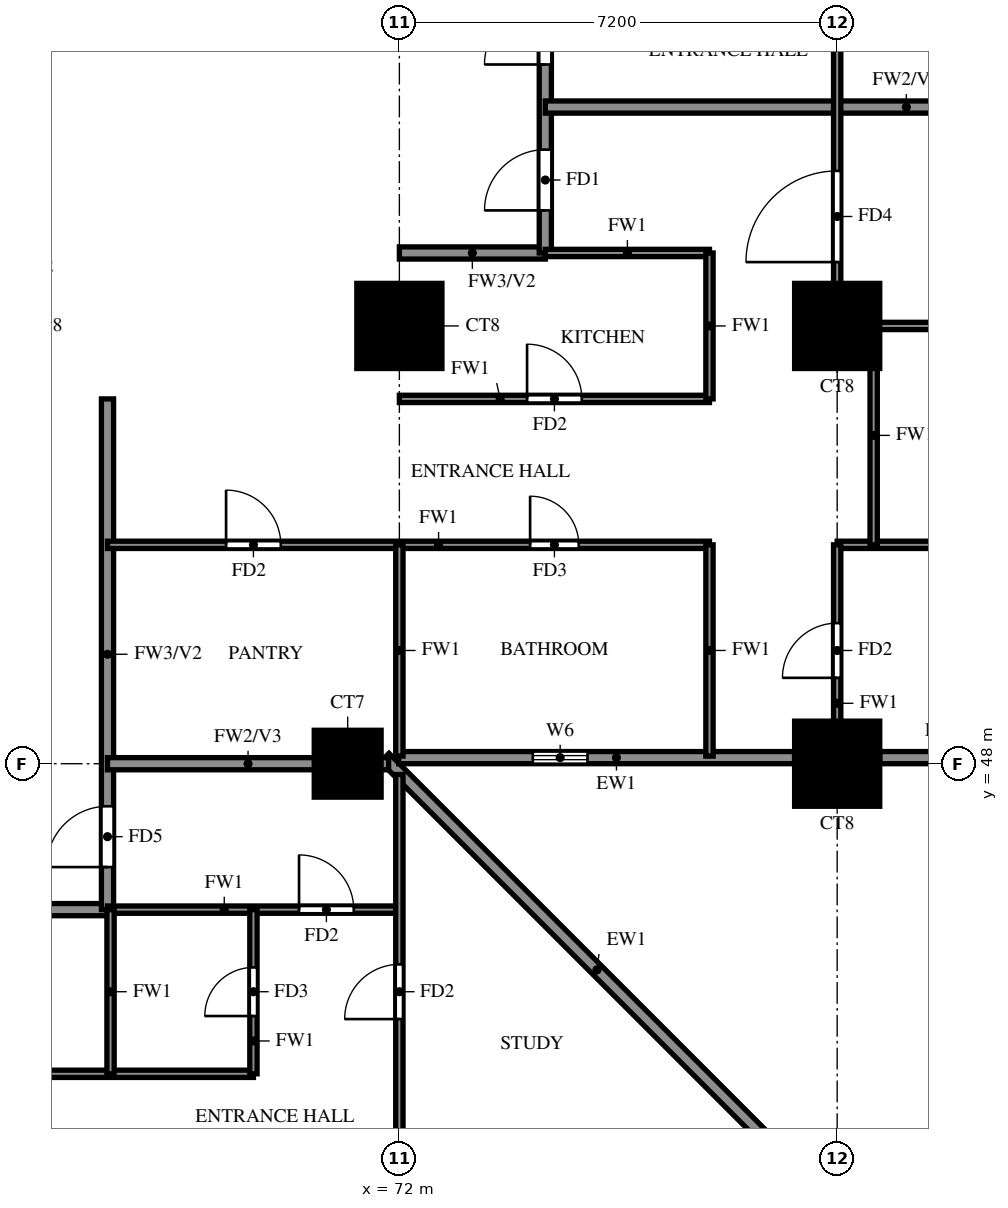
"""IFC4 building model, lengths in metres.
Left out: names, types, materials, properties, quantities, classifications, styles, units other than length and angle.
Written with IfcOpenShell. Run it as: python <this file> out.ifc"""

import sys

from ifc_helpers import new_model, si_unit, direction, frame, frame_2d, origin, origin_2d, place, context, subcontext, project, spatial, rectangle, extrude, source, transform, mapped, element, fill, save


model = new_model("IFC4")
c1 = context("Model", 3, precision=1e-05, world=origin(), true_north=direction((0.0, 1.0)))
c2 = subcontext(c1, "Body", "Model", "MODEL_VIEW")
j1 = project(units=[si_unit("LENGTHUNIT", "METRE"), si_unit("PLANEANGLEUNIT", "RADIAN")], contexts=[c1])
p1 = place(None, origin())
s1 = spatial("IfcSite", under=j1, at=p1, CompositionType="ELEMENT")
p2 = place(p1, origin())
s2 = spatial("IfcBuilding", under=s1, at=p2, CompositionType="ELEMENT")
p3 = place(p2, frame((0.0, 0.0, 37.5)))
s3 = spatial("IfcBuildingStorey", under=s2, at=p3, CompositionType="ELEMENT", Elevation=37.5)
m1 = source(origin(), c2, "Body", "SweptSolid", [
    extrude(rectangle(XDim=1.1, YDim=1.1, at=origin_2d()), origin(), (0.0, 0.0, 1.0), 3.18),
])
p4 = place(p3, frame((71.15, 48.0, 0.0), z_axis=(0.0, 0.0, 1.0), x_axis=(1.0, 0.0, 0.0)))
e1 = element("IfcColumn", 1, at=p4, inside=s3, PredefinedType="COLUMN", context=c2, shape_type="MappedRepresentation", body=[
    mapped(m1, transform((0.0, 0.0, 0.0))),
])
m2 = source(origin(), c2, "Body", "SweptSolid", [
    extrude(rectangle(XDim=1.4, YDim=1.4, at=origin_2d()), origin(), (0.0, 0.0, 1.0), 3.18),
])
for number, where, z_axis, x_axis in (
    (2, (79.2, 48.0, 0.0), (0.0, 0.0, 1.0), (1.0, 0.0, 0.0)),
    (3, (72.0, 55.2, 0.0), (0.0, 0.0, 1.0), (1.0, 0.0, 0.0)),
    (4, (79.2, 55.2, 0.0), (0.0, 0.0, 1.0), (1.0, 0.0, 0.0)),
):
    element("IfcColumn", number, at=place(p3, frame(where, z_axis=z_axis, x_axis=x_axis)), inside=s3, PredefinedType="COLUMN", context=c2, shape_type="MappedRepresentation", body=[
        mapped(m2, transform((0.0, 0.0, 0.0))),
    ])
p5 = place(p3, frame((78.74, 41.118, 0.0), z_axis=(0.0, 0.0, 1.0), x_axis=(-0.707106781187, 0.707106781187, 0.0)))
e5 = element("IfcWall", 5, at=p5, inside=s3, PredefinedType="SOLIDWALL", context=c2, shape_type="SweptSolid", body=[
    extrude(rectangle(XDim=9.874, YDim=0.2, at=frame_2d((4.937, 0.0))), origin(), (0.0, 0.0, 1.0), 3.18),
])
p6 = place(p3, frame((71.989, 48.1, 0.0), z_axis=(0.0, 0.0, 1.0), x_axis=(1.0, 0.0, 0.0)))
e6 = element("IfcWall", 6, at=p6, inside=s3, PredefinedType="SOLIDWALL", context=c2, shape_type="SweptSolid", body=[
    extrude(rectangle(XDim=6.511, YDim=0.2, at=frame_2d((3.256, 0.0))), origin(), (0.0, 0.0, 1.0), 3.18),
])
p7 = place(p6, frame((2.206, 0.0, 1.5)))
e7 = element("IfcOpeningElement", 7, at=p7, cuts=e6, PredefinedType="OPENING", context=c2, shape_type="SweptSolid", body=[
    extrude(rectangle(XDim=0.9, YDim=0.9, at=frame_2d((0.45, 0.45))), frame((0.0, 0.11, 0.0), z_axis=(0.0, -1.0, 0.0), x_axis=(1.0, 0.0, 0.0)), (0.0, 0.0, 1.0), 0.22),
])
p8 = place(p3, frame((79.9, 48.1, 0.0), z_axis=(0.0, 0.0, 1.0), x_axis=(1.0, 0.0, 0.0)))
e8 = element("IfcWall", 8, at=p8, inside=s3, PredefinedType="SOLIDWALL", context=c2, shape_type="SweptSolid", body=[
    extrude(rectangle(XDim=5.35, YDim=0.2, at=frame_2d((2.675, 0.0))), origin(), (0.0, 0.0, 1.0), 3.18),
])
p9 = place(p8, frame((1.475, 0.0, 0.6)))
e9 = element("IfcOpeningElement", 9, at=p9, cuts=e8, PredefinedType="OPENING", context=c2, shape_type="SweptSolid", body=[
    extrude(rectangle(XDim=2.4, YDim=2.4, at=frame_2d((1.2, 1.2))), frame((0.0, 0.11, 0.0), z_axis=(0.0, -1.0, 0.0), x_axis=(1.0, 0.0, 0.0)), (0.0, 0.0, 1.0), 0.22),
])
p10 = place(p3, frame((60.0, 45.6, 0.0), z_axis=(0.0, 0.0, 1.0), x_axis=(1.0, 0.0, 0.0)))
e10 = element("IfcWall", 10, at=p10, inside=s3, PredefinedType="SOLIDWALL", context=c2, shape_type="SweptSolid", body=[
    extrude(rectangle(XDim=7.25, YDim=0.2, at=frame_2d((3.625, 0.0))), origin(), (0.0, 0.0, 1.0), 3.18),
])
p11 = place(p3, frame((72.0, 56.4, 0.0), z_axis=(0.0, 0.0, 1.0), x_axis=(1.0, 0.0, 0.0)))
e11 = element("IfcWall", 11, at=p11, inside=s3, PredefinedType="SOLIDWALL", context=c2, shape_type="SweptSolid", body=[
    extrude(rectangle(XDim=2.4, YDim=0.2, at=frame_2d((1.2, 0.0))), origin(), (0.0, 0.0, 1.0), 3.18),
])
p12 = place(p3, frame((67.2, 45.6, 0.0), z_axis=(0.0, 0.0, 1.0), x_axis=(0.0, 1.0, 0.0)))
e12 = element("IfcWall", 12, at=p12, inside=s3, PredefinedType="SOLIDWALL", context=c2, shape_type="SweptSolid", body=[
    extrude(rectangle(XDim=8.4, YDim=0.2, at=frame_2d((4.2, 0.0))), origin(), (0.0, 0.0, 1.0), 3.18),
])
p13 = place(p12, frame((0.7, 0.0, 0.0)))
e13 = element("IfcOpeningElement", 13, at=p13, cuts=e12, PredefinedType="OPENING", context=c2, shape_type="SweptSolid", body=[
    extrude(rectangle(XDim=1.0, YDim=2.1, at=frame_2d((0.5, 1.05))), frame((0.0, 0.11, 0.0), z_axis=(0.0, -1.0, 0.0), x_axis=(1.0, 0.0, 0.0)), (0.0, 0.0, 1.0), 0.22),
])
p14 = place(p3, frame((74.4, 56.4, 0.0), z_axis=(0.0, 0.0, 1.0), x_axis=(0.0, 1.0, 0.0)))
e14 = element("IfcWall", 14, at=p14, inside=s3, PredefinedType="SOLIDWALL", context=c2, shape_type="SweptSolid", body=[
    extrude(rectangle(XDim=9.6, YDim=0.2, at=frame_2d((4.8, 0.0))), origin(), (0.0, 0.0, 1.0), 3.18),
])
p15 = place(p14, frame((0.7, 0.0, 0.0)))
e15 = element("IfcOpeningElement", 15, at=p15, cuts=e14, PredefinedType="OPENING", context=c2, shape_type="SweptSolid", body=[
    extrude(rectangle(XDim=1.0, YDim=2.1, at=frame_2d((0.5, 1.05))), frame((0.0, 0.11, 0.0), z_axis=(0.0, -1.0, 0.0), x_axis=(1.0, 0.0, 0.0)), (0.0, 0.0, 1.0), 0.22),
])
p16 = place(p14, frame((3.1, 0.0, 0.0)))
e16 = element("IfcOpeningElement", 16, at=p16, cuts=e14, PredefinedType="OPENING", context=c2, shape_type="SweptSolid", body=[
    extrude(rectangle(XDim=1.0, YDim=2.1, at=frame_2d((0.5, 1.05))), frame((0.0, 0.11, 0.0), z_axis=(0.0, -1.0, 0.0), x_axis=(1.0, 0.0, 0.0)), (0.0, 0.0, 1.0), 0.22),
])
p17 = place(p3, frame((67.2, 48.0, 0.0), z_axis=(0.0, 0.0, 1.0), x_axis=(1.0, 0.0, 0.0)))
e17 = element("IfcWall", 17, at=p17, inside=s3, PredefinedType="SOLIDWALL", context=c2, shape_type="SweptSolid", body=[
    extrude(rectangle(XDim=4.623, YDim=0.2, at=frame_2d((2.312, 0.0))), origin(), (0.0, 0.0, 1.0), 3.18),
])
p18 = place(p3, frame((74.4, 58.8, 0.0), z_axis=(0.0, 0.0, 1.0), x_axis=(1.0, 0.0, 0.0)))
e18 = element("IfcWall", 18, at=p18, inside=s3, PredefinedType="SOLIDWALL", context=c2, shape_type="SweptSolid", body=[
    extrude(rectangle(XDim=11.875, YDim=0.2, at=frame_2d((5.938, 0.0))), origin(), (0.0, 0.0, 1.0), 2.28),
])
p19 = place(p3, frame((60.0, 42.9, 0.0), z_axis=(0.0, 0.0, 1.0), x_axis=(1.0, 0.0, 0.0)))
e19 = element("IfcWall", 19, at=p19, inside=s3, PredefinedType="PARTITIONING", context=c2, shape_type="SweptSolid", body=[
    extrude(rectangle(XDim=9.6, YDim=0.12, at=frame_2d((4.8, 0.0))), origin(), (0.0, 0.0, 1.0), 3.18),
])
p20 = place(p19, frame((4.4, 0.0, 0.0)))
e20 = element("IfcOpeningElement", 20, at=p20, cuts=e19, PredefinedType="OPENING", context=c2, shape_type="SweptSolid", body=[
    extrude(rectangle(XDim=0.9, YDim=2.1, at=frame_2d((0.45, 1.05))), frame((0.0, 0.07, 0.0), z_axis=(0.0, -1.0, 0.0), x_axis=(1.0, 0.0, 0.0)), (0.0, 0.0, 1.0), 0.14),
])
p21 = place(p19, frame((0.825, 0.0, 0.0)))
e21 = element("IfcOpeningElement", 21, at=p21, cuts=e19, PredefinedType="OPENING", context=c2, shape_type="SweptSolid", body=[
    extrude(rectangle(XDim=0.8, YDim=2.1, at=frame_2d((0.4, 1.05))), frame((0.0, 0.07, 0.0), z_axis=(0.0, -1.0, 0.0), x_axis=(1.0, 0.0, 0.0)), (0.0, 0.0, 1.0), 0.14),
])
p22 = place(p3, frame((67.2, 45.6, 0.0), z_axis=(0.0, 0.0, 1.0), x_axis=(1.0, 0.0, 0.0)))
e22 = element("IfcWall", 22, at=p22, inside=s3, PredefinedType="PARTITIONING", context=c2, shape_type="SweptSolid", body=[
    extrude(rectangle(XDim=4.8, YDim=0.12, at=frame_2d((2.4, 0.0))), origin(), (0.0, 0.0, 1.0), 3.18),
])
p23 = place(p22, frame((3.15, 0.0, 0.0)))
e23 = element("IfcOpeningElement", 23, at=p23, cuts=e22, PredefinedType="OPENING", context=c2, shape_type="SweptSolid", body=[
    extrude(rectangle(XDim=0.9, YDim=2.1, at=frame_2d((0.45, 1.05))), frame((0.0, 0.07, 0.0), z_axis=(0.0, -1.0, 0.0), x_axis=(1.0, 0.0, 0.0)), (0.0, 0.0, 1.0), 0.14),
])
p24 = place(p3, frame((67.2, 51.6, 0.0), z_axis=(0.0, 0.0, 1.0), x_axis=(1.0, 0.0, 0.0)))
e24 = element("IfcWall", 24, at=p24, inside=s3, PredefinedType="PARTITIONING", context=c2, shape_type="SweptSolid", body=[
    extrude(rectangle(XDim=9.9, YDim=0.12, at=frame_2d((4.95, 0.0))), origin(), (0.0, 0.0, 1.0), 3.18),
])
p25 = place(p24, frame((6.95, 0.0, 0.0)))
e25 = element("IfcOpeningElement", 25, at=p25, cuts=e24, PredefinedType="OPENING", context=c2, shape_type="SweptSolid", body=[
    extrude(rectangle(XDim=0.8, YDim=2.1, at=frame_2d((0.4, 1.05))), frame((0.0, 0.07, 0.0), z_axis=(0.0, -1.0, 0.0), x_axis=(1.0, 0.0, 0.0)), (0.0, 0.0, 1.0), 0.14),
])
p26 = place(p24, frame((1.95, 0.0, 0.0)))
e26 = element("IfcOpeningElement", 26, at=p26, cuts=e24, PredefinedType="OPENING", context=c2, shape_type="SweptSolid", body=[
    extrude(rectangle(XDim=0.9, YDim=2.1, at=frame_2d((0.45, 1.05))), frame((0.0, 0.07, 0.0), z_axis=(0.0, -1.0, 0.0), x_axis=(1.0, 0.0, 0.0)), (0.0, 0.0, 1.0), 0.14),
])
p27 = place(p3, frame((79.2, 51.6, 0.0), z_axis=(0.0, 0.0, 1.0), x_axis=(1.0, 0.0, 0.0)))
e27 = element("IfcWall", 27, at=p27, inside=s3, PredefinedType="PARTITIONING", context=c2, shape_type="SweptSolid", body=[
    extrude(rectangle(XDim=7.075, YDim=0.12, at=frame_2d((3.538, 0.0))), origin(), (0.0, 0.0, 1.0), 2.28),
])
p28 = place(p27, frame((3.438, 0.0, 0.0)))
e28 = element("IfcOpeningElement", 28, at=p28, cuts=e27, PredefinedType="OPENING", context=c2, shape_type="SweptSolid", body=[
    extrude(rectangle(XDim=0.8, YDim=2.1, at=frame_2d((0.4, 1.05))), frame((0.0, 0.07, 0.0), z_axis=(0.0, -1.0, 0.0), x_axis=(1.0, 0.0, 0.0)), (0.0, 0.0, 1.0), 0.14),
])
p29 = place(p3, frame((72.0, 54.0, 0.0), z_axis=(0.0, 0.0, 1.0), x_axis=(1.0, 0.0, 0.0)))
e29 = element("IfcWall", 29, at=p29, inside=s3, PredefinedType="PARTITIONING", context=c2, shape_type="SweptSolid", body=[
    extrude(rectangle(XDim=5.1, YDim=0.12, at=frame_2d((2.55, 0.0))), origin(), (0.0, 0.0, 1.0), 3.18),
])
p30 = place(p29, frame((2.1, 0.0, 0.0)))
e30 = element("IfcOpeningElement", 30, at=p30, cuts=e29, PredefinedType="OPENING", context=c2, shape_type="SweptSolid", body=[
    extrude(rectangle(XDim=0.9, YDim=2.1, at=frame_2d((0.45, 1.05))), frame((0.0, 0.07, 0.0), z_axis=(0.0, -1.0, 0.0), x_axis=(1.0, 0.0, 0.0)), (0.0, 0.0, 1.0), 0.14),
])
p31 = place(p3, frame((79.2, 55.2, 0.0), z_axis=(0.0, 0.0, 1.0), x_axis=(1.0, 0.0, 0.0)))
e31 = element("IfcWall", 31, at=p31, inside=s3, PredefinedType="PARTITIONING", context=c2, shape_type="SweptSolid", body=[
    extrude(rectangle(XDim=7.075, YDim=0.12, at=frame_2d((3.538, 0.0))), origin(), (0.0, 0.0, 1.0), 3.18),
])
for number, where, z_axis, x_axis in (
    (32, (74.4, 56.4, 0.0), (0.0, 0.0, 1.0), (1.0, 0.0, 0.0)),
    (33, (67.25, 42.9, 0.0), (0.0, 0.0, 1.0), (0.0, 1.0, 0.0)),
):
    element("IfcWall", number, at=place(p3, frame(where, z_axis=z_axis, x_axis=x_axis)), inside=s3, PredefinedType="PARTITIONING", context=c2, shape_type="SweptSolid", body=[
        extrude(rectangle(XDim=2.7, YDim=0.12, at=frame_2d((1.35, 0.0))), origin(), (0.0, 0.0, 1.0), 3.18),
    ])
p32 = place(p3, frame((69.6, 42.9, 0.0), z_axis=(0.0, 0.0, 1.0), x_axis=(0.0, 1.0, 0.0)))
e34 = element("IfcWall", 34, at=p32, inside=s3, PredefinedType="PARTITIONING", context=c2, shape_type="SweptSolid", body=[
    extrude(rectangle(XDim=2.7, YDim=0.12, at=frame_2d((1.35, 0.0))), origin(), (0.0, 0.0, 1.0), 3.18),
])
p33 = place(p32, frame((0.95, 0.0, 0.0)))
e35 = element("IfcOpeningElement", 35, at=p33, cuts=e34, PredefinedType="OPENING", context=c2, shape_type="SweptSolid", body=[
    extrude(rectangle(XDim=0.8, YDim=2.1, at=frame_2d((0.4, 1.05))), frame((0.0, 0.07, 0.0), z_axis=(0.0, -1.0, 0.0), x_axis=(1.0, 0.0, 0.0)), (0.0, 0.0, 1.0), 0.14),
])
p34 = place(p3, frame((72.0, 33.725, 0.0), z_axis=(0.0, 0.0, 1.0), x_axis=(0.0, 1.0, 0.0)))
e36 = element("IfcWall", 36, at=p34, inside=s3, PredefinedType="PARTITIONING", context=c2, shape_type="SweptSolid", body=[
    extrude(rectangle(XDim=14.098, YDim=0.12, at=frame_2d((7.049, 0.0))), origin(), (0.0, 0.0, 1.0), 2.28),
])
p35 = place(p34, frame((10.075, 0.0, 0.0)))
e37 = element("IfcOpeningElement", 37, at=p35, cuts=e36, PredefinedType="OPENING", context=c2, shape_type="SweptSolid", body=[
    extrude(rectangle(XDim=0.9, YDim=2.1, at=frame_2d((0.45, 1.05))), frame((0.0, 0.07, 0.0), z_axis=(0.0, -1.0, 0.0), x_axis=(1.0, 0.0, 0.0)), (0.0, 0.0, 1.0), 0.14),
])
for number, where, z_axis, x_axis in (
    (38, (72.0, 48.125, 0.0), (0.0, 0.0, 1.0), (0.0, 1.0, 0.0)),
    (39, (77.1, 48.125, 0.0), (0.0, 0.0, 1.0), (0.0, 1.0, 0.0)),
):
    element("IfcWall", number, at=place(p3, frame(where, z_axis=z_axis, x_axis=x_axis)), inside=s3, PredefinedType="PARTITIONING", context=c2, shape_type="SweptSolid", body=[
        extrude(rectangle(XDim=3.475, YDim=0.12, at=frame_2d((1.738, 0.0))), origin(), (0.0, 0.0, 1.0), 3.18),
    ])
p36 = place(p3, frame((77.1, 54.0, 0.0), z_axis=(0.0, 0.0, 1.0), x_axis=(0.0, 1.0, 0.0)))
e40 = element("IfcWall", 40, at=p36, inside=s3, PredefinedType="PARTITIONING", context=c2, shape_type="SweptSolid", body=[
    extrude(rectangle(XDim=2.4, YDim=0.12, at=frame_2d((1.2, 0.0))), origin(), (0.0, 0.0, 1.0), 3.18),
])
p37 = place(p3, frame((79.2, 48.125, 0.0), z_axis=(0.0, 0.0, 1.0), x_axis=(0.0, 1.0, 0.0)))
e41 = element("IfcWall", 41, at=p37, inside=s3, PredefinedType="PARTITIONING", context=c2, shape_type="SweptSolid", body=[
    extrude(rectangle(XDim=3.475, YDim=0.12, at=frame_2d((1.738, 0.0))), origin(), (0.0, 0.0, 1.0), 3.18),
])
p38 = place(p37, frame((1.288, 0.0, 0.0)))
e42 = element("IfcOpeningElement", 42, at=p38, cuts=e41, PredefinedType="OPENING", context=c2, shape_type="SweptSolid", body=[
    extrude(rectangle(XDim=0.9, YDim=2.1, at=frame_2d((0.45, 1.05))), frame((0.0, 0.07, 0.0), z_axis=(0.0, -1.0, 0.0), x_axis=(1.0, 0.0, 0.0)), (0.0, 0.0, 1.0), 0.14),
])
p39 = place(p3, frame((79.2, 55.2, 0.0), z_axis=(0.0, 0.0, 1.0), x_axis=(0.0, 1.0, 0.0)))
e43 = element("IfcWall", 43, at=p39, inside=s3, PredefinedType="PARTITIONING", context=c2, shape_type="SweptSolid", body=[
    extrude(rectangle(XDim=18.0, YDim=0.12, at=frame_2d((9.0, 0.0))), origin(), (0.0, 0.0, 1.0), 3.18),
])
p40 = place(p39, frame((1.05, 0.0, 0.0)))
e44 = element("IfcOpeningElement", 44, at=p40, cuts=e43, PredefinedType="OPENING", context=c2, shape_type="SweptSolid", body=[
    extrude(rectangle(XDim=1.5, YDim=2.1, at=frame_2d((0.75, 1.05))), frame((0.0, 0.07, 0.0), z_axis=(0.0, -1.0, 0.0), x_axis=(1.0, 0.0, 0.0)), (0.0, 0.0, 1.0), 0.14),
])
p41 = place(p39, frame((4.95, 0.0, 0.0)))
e45 = element("IfcOpeningElement", 45, at=p41, cuts=e43, PredefinedType="OPENING", context=c2, shape_type="SweptSolid", body=[
    extrude(rectangle(XDim=0.9, YDim=2.1, at=frame_2d((0.45, 1.05))), frame((0.0, 0.07, 0.0), z_axis=(0.0, -1.0, 0.0), x_axis=(1.0, 0.0, 0.0)), (0.0, 0.0, 1.0), 0.14),
])
p42 = place(p39, frame((8.55, 0.0, 0.0)))
e46 = element("IfcOpeningElement", 46, at=p42, cuts=e43, PredefinedType="OPENING", context=c2, shape_type="SweptSolid", body=[
    extrude(rectangle(XDim=0.9, YDim=2.1, at=frame_2d((0.45, 1.05))), frame((0.0, 0.07, 0.0), z_axis=(0.0, -1.0, 0.0), x_axis=(1.0, 0.0, 0.0)), (0.0, 0.0, 1.0), 0.14),
])
p43 = place(p39, frame((12.15, 0.0, 0.0)))
e47 = element("IfcOpeningElement", 47, at=p43, cuts=e43, PredefinedType="OPENING", context=c2, shape_type="SweptSolid", body=[
    extrude(rectangle(XDim=0.9, YDim=2.1, at=frame_2d((0.45, 1.05))), frame((0.0, 0.07, 0.0), z_axis=(0.0, -1.0, 0.0), x_axis=(1.0, 0.0, 0.0)), (0.0, 0.0, 1.0), 0.14),
])
p44 = place(p39, frame((15.75, 0.0, 0.0)))
e48 = element("IfcOpeningElement", 48, at=p44, cuts=e43, PredefinedType="OPENING", context=c2, shape_type="SweptSolid", body=[
    extrude(rectangle(XDim=0.9, YDim=2.1, at=frame_2d((0.45, 1.05))), frame((0.0, 0.07, 0.0), z_axis=(0.0, -1.0, 0.0), x_axis=(1.0, 0.0, 0.0)), (0.0, 0.0, 1.0), 0.14),
])
p45 = place(p3, frame((79.8, 51.6, 0.0), z_axis=(0.0, 0.0, 1.0), x_axis=(0.0, 1.0, 0.0)))
e49 = element("IfcWall", 49, at=p45, inside=s3, PredefinedType="PARTITIONING", context=c2, shape_type="SweptSolid", body=[
    extrude(rectangle(XDim=3.6, YDim=0.12, at=frame_2d((1.8, 0.0))), origin(), (0.0, 0.0, 1.0), 3.18),
])
p46 = place(p7, origin())
e50 = element("IfcWindow", 50, at=p46, inside=s3, PartitioningType="SINGLE_PANEL", PredefinedType="WINDOW", context=c2, shape_type="SweptSolid", body=[
    extrude(rectangle(XDim=0.9, YDim=0.9, at=frame_2d((0.45, 0.45))), frame((0.0, 0.03, 0.0), z_axis=(0.0, -1.0, 0.0), x_axis=(1.0, 0.0, 0.0)), (0.0, 0.0, 1.0), 0.06),
])
fill(e7, e50)
p47 = place(p15, origin())
e51 = element("IfcDoor", 51, at=p47, inside=s3, OperationType="SINGLE_SWING_LEFT", PredefinedType="DOOR", context=c2, shape_type="SweptSolid", body=[
    extrude(rectangle(XDim=1.0, YDim=2.1, at=frame_2d((0.5, 1.05))), frame((0.0, 0.025, 0.0), z_axis=(0.0, -1.0, 0.0), x_axis=(1.0, 0.0, 0.0)), (0.0, 0.0, 1.0), 0.05),
])
fill(e15, e51)
p48 = place(p38, origin())
e52 = element("IfcDoor", 52, at=p48, inside=s3, OperationType="SINGLE_SWING_LEFT", PredefinedType="DOOR", context=c2, shape_type="SweptSolid", body=[
    extrude(rectangle(XDim=0.9, YDim=2.1, at=frame_2d((0.45, 1.05))), frame((0.0, 0.025, 0.0), z_axis=(0.0, -1.0, 0.0), x_axis=(1.0, 0.0, 0.0)), (0.0, 0.0, 1.0), 0.05),
])
fill(e42, e52)
p49 = place(p40, origin())
e53 = element("IfcDoor", 53, at=p49, inside=s3, OperationType="SINGLE_SWING_LEFT", PredefinedType="DOOR", context=c2, shape_type="SweptSolid", body=[
    extrude(rectangle(XDim=1.5, YDim=2.1, at=frame_2d((0.75, 1.05))), frame((0.0, 0.025, 0.0), z_axis=(0.0, -1.0, 0.0), x_axis=(1.0, 0.0, 0.0)), (0.0, 0.0, 1.0), 0.05),
])
fill(e44, e53)
p50 = place(p25, origin())
e54 = element("IfcDoor", 54, at=p50, inside=s3, OperationType="SINGLE_SWING_LEFT", PredefinedType="DOOR", context=c2, shape_type="SweptSolid", body=[
    extrude(rectangle(XDim=0.8, YDim=2.1, at=frame_2d((0.4, 1.05))), frame((0.0, 0.025, 0.0), z_axis=(0.0, -1.0, 0.0), x_axis=(1.0, 0.0, 0.0)), (0.0, 0.0, 1.0), 0.05),
])
fill(e25, e54)
p51 = place(p30, origin())
e55 = element("IfcDoor", 55, at=p51, inside=s3, OperationType="SINGLE_SWING_RIGHT", PredefinedType="DOOR", context=c2, shape_type="SweptSolid", body=[
    extrude(rectangle(XDim=0.9, YDim=2.1, at=frame_2d((0.45, 1.05))), frame((0.0, 0.025, 0.0), z_axis=(0.0, -1.0, 0.0), x_axis=(1.0, 0.0, 0.0)), (0.0, 0.0, 1.0), 0.05),
])
fill(e30, e55)
p52 = place(p26, origin())
e56 = element("IfcDoor", 56, at=p52, inside=s3, OperationType="SINGLE_SWING_LEFT", PredefinedType="DOOR", context=c2, shape_type="SweptSolid", body=[
    extrude(rectangle(XDim=0.9, YDim=2.1, at=frame_2d((0.45, 1.05))), frame((0.0, 0.025, 0.0), z_axis=(0.0, -1.0, 0.0), x_axis=(1.0, 0.0, 0.0)), (0.0, 0.0, 1.0), 0.05),
])
fill(e26, e56)
p53 = place(p16, origin())
e57 = element("IfcDoor", 57, at=p53, inside=s3, OperationType="SINGLE_SWING_RIGHT", PredefinedType="DOOR", context=c2, shape_type="SweptSolid", body=[
    extrude(rectangle(XDim=1.0, YDim=2.1, at=frame_2d((0.5, 1.05))), frame((0.0, 0.025, 0.0), z_axis=(0.0, -1.0, 0.0), x_axis=(1.0, 0.0, 0.0)), (0.0, 0.0, 1.0), 0.05),
])
fill(e16, e57)
p54 = place(p23, origin())
e58 = element("IfcDoor", 58, at=p54, inside=s3, OperationType="SINGLE_SWING_RIGHT", PredefinedType="DOOR", context=c2, shape_type="SweptSolid", body=[
    extrude(rectangle(XDim=0.9, YDim=2.1, at=frame_2d((0.45, 1.05))), frame((0.0, 0.025, 0.0), z_axis=(0.0, -1.0, 0.0), x_axis=(1.0, 0.0, 0.0)), (0.0, 0.0, 1.0), 0.05),
])
fill(e23, e58)
p55 = place(p13, origin())
e59 = element("IfcDoor", 59, at=p55, inside=s3, OperationType="SINGLE_SWING_LEFT", PredefinedType="DOOR", context=c2, shape_type="SweptSolid", body=[
    extrude(rectangle(XDim=1.0, YDim=2.1, at=frame_2d((0.5, 1.05))), frame((0.0, 0.025, 0.0), z_axis=(0.0, -1.0, 0.0), x_axis=(1.0, 0.0, 0.0)), (0.0, 0.0, 1.0), 0.05),
])
fill(e13, e59)
p56 = place(p33, origin())
e60 = element("IfcDoor", 60, at=p56, inside=s3, OperationType="SINGLE_SWING_LEFT", PredefinedType="DOOR", context=c2, shape_type="SweptSolid", body=[
    extrude(rectangle(XDim=0.8, YDim=2.1, at=frame_2d((0.4, 1.05))), frame((0.0, 0.025, 0.0), z_axis=(0.0, -1.0, 0.0), x_axis=(1.0, 0.0, 0.0)), (0.0, 0.0, 1.0), 0.05),
])
fill(e35, e60)
p57 = place(p35, origin())
e61 = element("IfcDoor", 61, at=p57, inside=s3, OperationType="SINGLE_SWING_LEFT", PredefinedType="DOOR", context=c2, shape_type="SweptSolid", body=[
    extrude(rectangle(XDim=0.9, YDim=2.1, at=frame_2d((0.45, 1.05))), frame((0.0, 0.025, 0.0), z_axis=(0.0, -1.0, 0.0), x_axis=(1.0, 0.0, 0.0)), (0.0, 0.0, 1.0), 0.05),
])
fill(e37, e61)
save(model, sys.argv[1])
